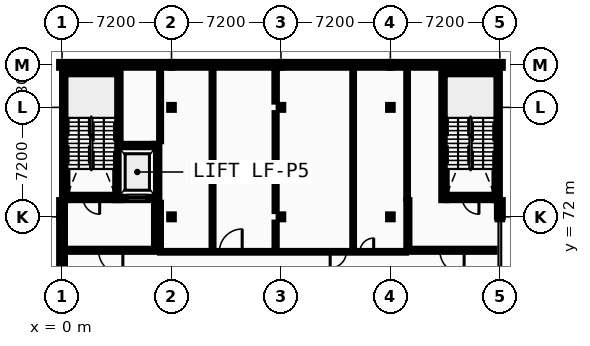
"""IFC4 building model, lengths in metres.
Left out: names, types, materials, properties, quantities, classifications, styles, units other than length and angle.
Written with IfcOpenShell. Run it as: python <this file> out.ifc"""

import sys

from ifc_helpers import new_model, si_unit, direction, frame, frame_2d, origin, origin_2d, place, context, subcontext, project, spatial, rectangle, i_section, extrude, element, fill, save


model = new_model("IFC4")
c1 = context("Model", 3, precision=1e-05, world=origin(), true_north=direction((0.0, 1.0)))
c2 = subcontext(c1, "Body", "Model", "MODEL_VIEW")
j1 = project(units=[si_unit("LENGTHUNIT", "METRE"), si_unit("PLANEANGLEUNIT", "RADIAN")], contexts=[c1])
p1 = place(None, origin())
s1 = spatial("IfcSite", under=j1, at=p1, CompositionType="ELEMENT")
p2 = place(p1, origin())
s2 = spatial("IfcBuilding", under=s1, at=p2, CompositionType="ELEMENT")
p3 = place(p2, frame((0.0, 0.0, 9.6)))
s3 = spatial("IfcBuildingStorey", under=s2, at=p3, CompositionType="ELEMENT", Elevation=9.6)
for number, where, z_axis, x_axis in (
    (1, (0.0, 72.0, 0.0), (0.0, 0.0, 1.0), (1.0, 0.0, 0.0)),
    (2, (0.0, 82.0, 0.0), (0.0, 0.0, 1.0), (1.0, 0.0, 0.0)),
    (3, (7.2, 72.0, 0.0), (0.0, 0.0, 1.0), (1.0, 0.0, 0.0)),
    (4, (7.2, 79.2, 0.0), (0.0, 0.0, 1.0), (1.0, 0.0, 0.0)),
    (5, (7.2, 82.0, 0.0), (0.0, 0.0, 1.0), (1.0, 0.0, 0.0)),
    (6, (14.4, 72.0, 0.0), (0.0, 0.0, 1.0), (1.0, 0.0, 0.0)),
    (7, (14.4, 79.2, 0.0), (0.0, 0.0, 1.0), (1.0, 0.0, 0.0)),
    (8, (14.4, 82.0, 0.0), (0.0, 0.0, 1.0), (1.0, 0.0, 0.0)),
    (9, (21.6, 72.0, 0.0), (0.0, 0.0, 1.0), (1.0, 0.0, 0.0)),
    (10, (21.6, 79.2, 0.0), (0.0, 0.0, 1.0), (1.0, 0.0, 0.0)),
    (11, (21.6, 82.0, 0.0), (0.0, 0.0, 1.0), (1.0, 0.0, 0.0)),
    (12, (28.8, 72.0, 0.0), (0.0, 0.0, 1.0), (1.0, 0.0, 0.0)),
    (13, (28.8, 82.0, 0.0), (0.0, 0.0, 1.0), (1.0, 0.0, 0.0)),
):
    element("IfcColumn", number, at=place(p3, frame(where, z_axis=z_axis, x_axis=x_axis)), inside=s3, PredefinedType="COLUMN", context=c2, shape_type="SweptSolid", body=[
        extrude(i_section(OverallWidth=0.3, OverallDepth=0.32, WebThickness=0.011, FlangeThickness=0.021, FilletRadius=0.027, at=origin_2d()), origin(), (0.0, 0.0, 1.0), 4.4),
    ])
p4 = place(p3, frame((7.2, 82.0, 0.0), z_axis=(0.0, 0.0, 1.0), x_axis=(-1.0, 0.0, 0.0)))
e14 = element("IfcWall", 14, at=p4, inside=s3, PredefinedType="STANDARD", context=c2, shape_type="SweptSolid", body=[
    extrude(rectangle(XDim=7.39, YDim=0.38, at=frame_2d((3.695, 0.0))), origin(), (0.0, 0.0, 1.0), 3.895),
])
p5 = place(p4, frame((1.6, 0.0, 0.95)))
e15 = element("IfcOpeningElement", 15, at=p5, cuts=e14, PredefinedType="OPENING", context=c2, shape_type="SweptSolid", body=[
    extrude(rectangle(XDim=1.234, YDim=1.26, at=frame_2d((0.617, 0.63))), frame((0.0, 0.2, 0.0), z_axis=(0.0, -1.0, 0.0), x_axis=(1.0, 0.0, 0.0)), (0.0, 0.0, 1.0), 0.4),
])
p6 = place(p4, frame((4.556, 0.0, 0.95)))
e16 = element("IfcOpeningElement", 16, at=p6, cuts=e14, PredefinedType="OPENING", context=c2, shape_type="SweptSolid", body=[
    extrude(rectangle(XDim=1.234, YDim=1.26, at=frame_2d((0.617, 0.63))), frame((0.0, 0.2, 0.0), z_axis=(0.0, -1.0, 0.0), x_axis=(1.0, 0.0, 0.0)), (0.0, 0.0, 1.0), 0.4),
])
p7 = place(p3, frame((14.4, 82.0, 0.0), z_axis=(0.0, 0.0, 1.0), x_axis=(-1.0, 0.0, 0.0)))
e17 = element("IfcWall", 17, at=p7, inside=s3, PredefinedType="STANDARD", context=c2, shape_type="SweptSolid", body=[
    extrude(rectangle(XDim=7.2, YDim=0.38, at=frame_2d((3.6, 0.0))), origin(), (0.0, 0.0, 1.0), 3.895),
])
p8 = place(p7, frame((1.526, 0.0, 0.95)))
e18 = element("IfcOpeningElement", 18, at=p8, cuts=e17, PredefinedType="OPENING", context=c2, shape_type="SweptSolid", body=[
    extrude(rectangle(XDim=1.268, YDim=1.26, at=frame_2d((0.634, 0.63))), frame((0.0, 0.2, 0.0), z_axis=(0.0, -1.0, 0.0), x_axis=(1.0, 0.0, 0.0)), (0.0, 0.0, 1.0), 0.4),
])
p9 = place(p3, frame((21.6, 82.0, 0.0), z_axis=(0.0, 0.0, 1.0), x_axis=(-1.0, 0.0, 0.0)))
e19 = element("IfcWall", 19, at=p9, inside=s3, PredefinedType="STANDARD", context=c2, shape_type="SweptSolid", body=[
    extrude(rectangle(XDim=7.2, YDim=0.38, at=frame_2d((3.6, 0.0))), origin(), (0.0, 0.0, 1.0), 3.895),
])
p10 = place(p9, frame((4.61, 0.0, 0.95)))
e20 = element("IfcOpeningElement", 20, at=p10, cuts=e19, PredefinedType="OPENING", context=c2, shape_type="SweptSolid", body=[
    extrude(rectangle(XDim=0.86, YDim=1.296, at=frame_2d((0.43, 0.648))), frame((0.0, 0.2, 0.0), z_axis=(0.0, -1.0, 0.0), x_axis=(1.0, 0.0, 0.0)), (0.0, 0.0, 1.0), 0.4),
])
p11 = place(p3, frame((28.99, 82.0, 0.0), z_axis=(0.0, 0.0, 1.0), x_axis=(-1.0, 0.0, 0.0)))
e21 = element("IfcWall", 21, at=p11, inside=s3, PredefinedType="STANDARD", context=c2, shape_type="SweptSolid", body=[
    extrude(rectangle(XDim=7.39, YDim=0.38, at=frame_2d((3.695, 0.0))), origin(), (0.0, 0.0, 1.0), 3.895),
])
p12 = place(p11, frame((1.77, 0.0, 0.95)))
e22 = element("IfcOpeningElement", 22, at=p12, cuts=e21, PredefinedType="OPENING", context=c2, shape_type="SweptSolid", body=[
    extrude(rectangle(XDim=0.894, YDim=1.296, at=frame_2d((0.447, 0.648))), frame((0.0, 0.2, 0.0), z_axis=(0.0, -1.0, 0.0), x_axis=(1.0, 0.0, 0.0)), (0.0, 0.0, 1.0), 0.4),
])
p13 = place(p11, frame((4.726, 0.0, 0.95)))
e23 = element("IfcOpeningElement", 23, at=p13, cuts=e21, PredefinedType="OPENING", context=c2, shape_type="SweptSolid", body=[
    extrude(rectangle(XDim=0.894, YDim=1.296, at=frame_2d((0.447, 0.648))), frame((0.0, 0.2, 0.0), z_axis=(0.0, -1.0, 0.0), x_axis=(1.0, 0.0, 0.0)), (0.0, 0.0, 1.0), 0.4),
])
p14 = place(p3, frame((0.0, 72.0, 0.0), z_axis=(0.0, 0.0, 1.0), x_axis=(0.0, -1.0, 0.0)))
e24 = element("IfcWall", 24, at=p14, inside=s3, PredefinedType="STANDARD", context=c2, shape_type="SweptSolid", body=[
    extrude(rectangle(XDim=7.2, YDim=0.38, at=frame_2d((3.6, 0.0))), origin(), (0.0, 0.0, 1.0), 3.885),
])
for number, where, z_axis, x_axis in (
    (25, (0.0, 73.1, 0.0), (0.0, 0.0, 1.0), (0.0, -1.0, 0.0)),
    (26, (28.8, 72.0, 0.0), (0.0, 0.0, 1.0), (0.0, 1.0, 0.0)),
):
    element("IfcWall", number, at=place(p3, frame(where, z_axis=z_axis, x_axis=x_axis)), inside=s3, PredefinedType="STANDARD", context=c2, shape_type="SweptSolid", body=[
        extrude(rectangle(XDim=1.1, YDim=0.38, at=frame_2d((0.55, 0.0))), origin(), (0.0, 0.0, 1.0), 4.2),
    ])
p15 = place(p3, frame((0.35, 73.275, 0.0), z_axis=(0.0, 0.0, 1.0), x_axis=(1.0, 0.0, 0.0)))
e27 = element("IfcWall", 27, at=p15, inside=s3, PredefinedType="SHEAR", context=c2, shape_type="SweptSolid", body=[
    extrude(rectangle(XDim=3.15, YDim=0.35, at=frame_2d((1.575, 0.0))), origin(), (0.0, 0.0, 1.0), 4.2),
])
p16 = place(p15, frame((1.025, 0.0, 0.0)))
e28 = element("IfcOpeningElement", 28, at=p16, cuts=e27, PredefinedType="OPENING", context=c2, shape_type="SweptSolid", body=[
    extrude(rectangle(XDim=1.1, YDim=2.15, at=frame_2d((0.55, 1.075))), frame((0.0, 0.185, 0.0), z_axis=(0.0, -1.0, 0.0), x_axis=(1.0, 0.0, 0.0)), (0.0, 0.0, 1.0), 0.37),
])
p17 = place(p3, frame((0.35, 81.425, 0.0), z_axis=(0.0, 0.0, 1.0), x_axis=(1.0, 0.0, 0.0)))
e29 = element("IfcWall", 29, at=p17, inside=s3, PredefinedType="SHEAR", context=c2, shape_type="SweptSolid", body=[
    extrude(rectangle(XDim=3.15, YDim=0.35, at=frame_2d((1.575, 0.0))), origin(), (0.0, 0.0, 1.0), 4.2),
])
for number, where, z_axis, x_axis in (
    (30, (0.175, 73.1, 0.0), (0.0, 0.0, 1.0), (0.0, 1.0, 0.0)),
    (31, (3.675, 73.1, 0.0), (0.0, 0.0, 1.0), (0.0, 1.0, 0.0)),
):
    element("IfcWall", number, at=place(p3, frame(where, z_axis=z_axis, x_axis=x_axis)), inside=s3, PredefinedType="SHEAR", context=c2, shape_type="SweptSolid", body=[
        extrude(rectangle(XDim=8.71, YDim=0.35, at=frame_2d((4.355, 0.0))), origin(), (0.0, 0.0, 1.0), 4.2),
    ])
p18 = place(p3, frame((3.85, 73.275, 0.0), z_axis=(0.0, 0.0, 1.0), x_axis=(1.0, 0.0, 0.0)))
e32 = element("IfcWall", 32, at=p18, inside=s3, PredefinedType="SHEAR", context=c2, shape_type="SweptSolid", body=[
    extrude(rectangle(XDim=2.2, YDim=0.35, at=frame_2d((1.1, 0.0))), origin(), (0.0, 0.0, 1.0), 4.2),
])
p19 = place(p18, frame((0.5, 0.0, 0.0)))
e33 = element("IfcOpeningElement", 33, at=p19, cuts=e32, PredefinedType="OPENING", context=c2, shape_type="SweptSolid", body=[
    extrude(rectangle(XDim=1.2, YDim=2.2, at=frame_2d((0.6, 1.1))), frame((0.0, 0.185, 0.0), z_axis=(0.0, -1.0, 0.0), x_axis=(1.0, 0.0, 0.0)), (0.0, 0.0, 1.0), 0.37),
])
p20 = place(p3, frame((3.85, 76.625, 0.0), z_axis=(0.0, 0.0, 1.0), x_axis=(1.0, 0.0, 0.0)))
e34 = element("IfcWall", 34, at=p20, inside=s3, PredefinedType="SHEAR", context=c2, shape_type="SweptSolid", body=[
    extrude(rectangle(XDim=2.2, YDim=0.35, at=frame_2d((1.1, 0.0))), origin(), (0.0, 0.0, 1.0), 4.2),
])
p21 = place(p3, frame((6.225, 73.1, 0.0), z_axis=(0.0, 0.0, 1.0), x_axis=(0.0, 1.0, 0.0)))
e35 = element("IfcWall", 35, at=p21, inside=s3, PredefinedType="SHEAR", context=c2, shape_type="SweptSolid", body=[
    extrude(rectangle(XDim=3.7, YDim=0.35, at=frame_2d((1.85, 0.0))), origin(), (0.0, 0.0, 1.0), 4.2),
])
p22 = place(p3, frame((0.35, 69.8, 0.0), z_axis=(0.0, 0.0, 1.0), x_axis=(1.0, 0.0, 0.0)))
e36 = element("IfcWall", 36, at=p22, inside=s3, PredefinedType="PARTITIONING", context=c2, shape_type="SweptSolid", body=[
    extrude(rectangle(XDim=5.7, YDim=0.2, at=frame_2d((2.85, 0.0))), origin(), (0.0, 0.0, 1.0), 4.2),
])
p23 = place(p22, frame((2.05, 0.0, 0.0)))
e37 = element("IfcOpeningElement", 37, at=p23, cuts=e36, PredefinedType="OPENING", context=c2, shape_type="SweptSolid", body=[
    extrude(rectangle(XDim=1.6, YDim=2.2, at=frame_2d((0.8, 1.1))), frame((0.0, 0.11, 0.0), z_axis=(0.0, -1.0, 0.0), x_axis=(1.0, 0.0, 0.0)), (0.0, 0.0, 1.0), 0.22),
])
p24 = place(p3, frame((6.15, 69.9, 0.0), z_axis=(0.0, 0.0, 1.0), x_axis=(0.0, 1.0, 0.0)))
e38 = element("IfcWall", 38, at=p24, inside=s3, PredefinedType="PARTITIONING", context=c2, shape_type="SweptSolid", body=[
    extrude(rectangle(XDim=3.2, YDim=0.2, at=frame_2d((1.6, 0.0))), origin(), (0.0, 0.0, 1.0), 4.2),
])
p25 = place(p3, frame((25.3, 73.275, 0.0), z_axis=(0.0, 0.0, 1.0), x_axis=(1.0, 0.0, 0.0)))
e39 = element("IfcWall", 39, at=p25, inside=s3, PredefinedType="SHEAR", context=c2, shape_type="SweptSolid", body=[
    extrude(rectangle(XDim=3.15, YDim=0.35, at=frame_2d((1.575, 0.0))), origin(), (0.0, 0.0, 1.0), 4.2),
])
p26 = place(p25, frame((1.025, 0.0, 0.0)))
e40 = element("IfcOpeningElement", 40, at=p26, cuts=e39, PredefinedType="OPENING", context=c2, shape_type="SweptSolid", body=[
    extrude(rectangle(XDim=1.1, YDim=2.15, at=frame_2d((0.55, 1.075))), frame((0.0, 0.185, 0.0), z_axis=(0.0, -1.0, 0.0), x_axis=(1.0, 0.0, 0.0)), (0.0, 0.0, 1.0), 0.37),
])
p27 = place(p3, frame((25.3, 81.425, 0.0), z_axis=(0.0, 0.0, 1.0), x_axis=(1.0, 0.0, 0.0)))
e41 = element("IfcWall", 41, at=p27, inside=s3, PredefinedType="SHEAR", context=c2, shape_type="SweptSolid", body=[
    extrude(rectangle(XDim=3.15, YDim=0.35, at=frame_2d((1.575, 0.0))), origin(), (0.0, 0.0, 1.0), 4.2),
])
for number, where, z_axis, x_axis in (
    (42, (25.125, 73.1, 0.0), (0.0, 0.0, 1.0), (0.0, 1.0, 0.0)),
    (43, (28.625, 73.1, 0.0), (0.0, 0.0, 1.0), (0.0, 1.0, 0.0)),
):
    element("IfcWall", number, at=place(p3, frame(where, z_axis=z_axis, x_axis=x_axis)), inside=s3, PredefinedType="SHEAR", context=c2, shape_type="SweptSolid", body=[
        extrude(rectangle(XDim=8.71, YDim=0.35, at=frame_2d((4.355, 0.0))), origin(), (0.0, 0.0, 1.0), 4.2),
    ])
p28 = place(p3, frame((22.85, 69.8, 0.0), z_axis=(0.0, 0.0, 1.0), x_axis=(1.0, 0.0, 0.0)))
e44 = element("IfcWall", 44, at=p28, inside=s3, PredefinedType="PARTITIONING", context=c2, shape_type="SweptSolid", body=[
    extrude(rectangle(XDim=5.6, YDim=0.2, at=frame_2d((2.8, 0.0))), origin(), (0.0, 0.0, 1.0), 4.2),
])
p29 = place(p28, frame((2.0, 0.0, 0.0)))
e45 = element("IfcOpeningElement", 45, at=p29, cuts=e44, PredefinedType="OPENING", context=c2, shape_type="SweptSolid", body=[
    extrude(rectangle(XDim=1.6, YDim=2.2, at=frame_2d((0.8, 1.1))), frame((0.0, 0.11, 0.0), z_axis=(0.0, -1.0, 0.0), x_axis=(1.0, 0.0, 0.0)), (0.0, 0.0, 1.0), 0.22),
])
p30 = place(p3, frame((22.75, 69.9, 0.0), z_axis=(0.0, 0.0, 1.0), x_axis=(0.0, 1.0, 0.0)))
e46 = element("IfcWall", 46, at=p30, inside=s3, PredefinedType="PARTITIONING", context=c2, shape_type="SweptSolid", body=[
    extrude(rectangle(XDim=3.2, YDim=0.2, at=frame_2d((1.6, 0.0))), origin(), (0.0, 0.0, 1.0), 4.2),
])
p31 = place(p3, frame((6.45, 69.7, 0.0), z_axis=(0.0, 0.0, 1.0), x_axis=(1.0, 0.0, 0.0)))
e47 = element("IfcWall", 47, at=p31, inside=s3, PredefinedType="PARTITIONING", context=c2, shape_type="SweptSolid", body=[
    extrude(rectangle(XDim=16.18, YDim=0.11, at=frame_2d((8.09, 0.0))), origin(), (0.0, 0.0, 1.0), 4.2),
])
p32 = place(p31, frame((2.0, 0.0, 0.0)))
e48 = element("IfcOpeningElement", 48, at=p32, cuts=e47, PredefinedType="OPENING", context=c2, shape_type="SweptSolid", body=[
    extrude(rectangle(XDim=1.0, YDim=2.1, at=frame_2d((0.5, 1.05))), frame((0.0, 0.065, 0.0), z_axis=(0.0, -1.0, 0.0), x_axis=(1.0, 0.0, 0.0)), (0.0, 0.0, 1.0), 0.13),
])
p33 = place(p31, frame((13.15, 0.0, 0.0)))
e49 = element("IfcOpeningElement", 49, at=p33, cuts=e47, PredefinedType="OPENING", context=c2, shape_type="SweptSolid", body=[
    extrude(rectangle(XDim=0.9, YDim=2.1, at=frame_2d((0.45, 1.05))), frame((0.0, 0.065, 0.0), z_axis=(0.0, -1.0, 0.0), x_axis=(1.0, 0.0, 0.0)), (0.0, 0.0, 1.0), 0.13),
])
p34 = place(p31, frame((3.9, 0.0, 0.0)))
e50 = element("IfcOpeningElement", 50, at=p34, cuts=e47, PredefinedType="OPENING", context=c2, shape_type="SweptSolid", body=[
    extrude(rectangle(XDim=1.5, YDim=2.2, at=frame_2d((0.75, 1.1))), frame((0.0, 0.065, 0.0), z_axis=(0.0, -1.0, 0.0), x_axis=(1.0, 0.0, 0.0)), (0.0, 0.0, 1.0), 0.13),
])
p35 = place(p31, frame((11.188, 0.0, 0.0)))
e51 = element("IfcOpeningElement", 51, at=p35, cuts=e47, PredefinedType="OPENING", context=c2, shape_type="SweptSolid", body=[
    extrude(rectangle(XDim=1.062, YDim=2.152, at=frame_2d((0.531, 1.076))), frame((0.0, 0.065, 0.0), z_axis=(0.0, -1.0, 0.0), x_axis=(1.0, 0.0, 0.0)), (0.0, 0.0, 1.0), 0.13),
])
p36 = place(p3, frame((6.45, 69.755, 0.0), z_axis=(0.0, 0.0, 1.0), x_axis=(0.0, 1.0, 0.0)))
e52 = element("IfcWall", 52, at=p36, inside=s3, PredefinedType="PARTITIONING", context=c2, shape_type="SweptSolid", body=[
    extrude(rectangle(XDim=3.17, YDim=0.11, at=frame_2d((1.585, 0.0))), origin(), (0.0, 0.0, 1.0), 4.2),
])
p37 = place(p3, frame((6.45, 76.975, 0.0), z_axis=(0.0, 0.0, 1.0), x_axis=(0.0, 1.0, 0.0)))
e53 = element("IfcWall", 53, at=p37, inside=s3, PredefinedType="PARTITIONING", context=c2, shape_type="SweptSolid", body=[
    extrude(rectangle(XDim=4.825, YDim=0.125, at=frame_2d((2.413, 0.0))), origin(), (0.0, 0.0, 1.0), 4.2),
])
p38 = place(p3, frame((9.9, 69.755, 0.0), z_axis=(0.0, 0.0, 1.0), x_axis=(0.0, 1.0, 0.0)))
e54 = element("IfcWall", 54, at=p38, inside=s3, PredefinedType="PARTITIONING", context=c2, shape_type="SweptSolid", body=[
    extrude(rectangle(XDim=12.045, YDim=0.125, at=frame_2d((6.022, 0.0))), origin(), (0.0, 0.0, 1.0), 4.2),
])
p39 = place(p3, frame((14.05, 69.755, 0.0), z_axis=(0.0, 0.0, 1.0), x_axis=(0.0, 1.0, 0.0)))
e55 = element("IfcWall", 55, at=p39, inside=s3, PredefinedType="PARTITIONING", context=c2, shape_type="SweptSolid", body=[
    extrude(rectangle(XDim=1.865, YDim=0.142, at=frame_2d((0.933, 0.0))), origin(), (0.0, 0.0, 1.0), 4.2),
])
p40 = place(p3, frame((14.05, 72.38, 0.0), z_axis=(0.0, 0.0, 1.0), x_axis=(0.0, 1.0, 0.0)))
e56 = element("IfcWall", 56, at=p40, inside=s3, PredefinedType="PARTITIONING", context=c2, shape_type="SweptSolid", body=[
    extrude(rectangle(XDim=6.44, YDim=0.135, at=frame_2d((3.22, 0.0))), origin(), (0.0, 0.0, 1.0), 4.2),
])
p41 = place(p3, frame((14.05, 79.58, 0.0), z_axis=(0.0, 0.0, 1.0), x_axis=(0.0, 1.0, 0.0)))
e57 = element("IfcWall", 57, at=p41, inside=s3, PredefinedType="PARTITIONING", context=c2, shape_type="SweptSolid", body=[
    extrude(rectangle(XDim=2.04, YDim=0.16, at=frame_2d((1.02, 0.0))), origin(), (0.0, 0.0, 1.0), 4.2),
])
p42 = place(p3, frame((19.15, 69.755, 0.0), z_axis=(0.0, 0.0, 1.0), x_axis=(0.0, 1.0, 0.0)))
e58 = element("IfcWall", 58, at=p42, inside=s3, PredefinedType="PARTITIONING", context=c2, shape_type="SweptSolid", body=[
    extrude(rectangle(XDim=12.045, YDim=0.11, at=frame_2d((6.022, 0.0))), origin(), (0.0, 0.0, 1.0), 3.915),
])
p43 = place(p3, frame((22.7, 73.2, 0.0), z_axis=(0.0, 0.0, 1.0), x_axis=(0.0, 1.0, 0.0)))
e59 = element("IfcWall", 59, at=p43, inside=s3, PredefinedType="PARTITIONING", context=c2, shape_type="SweptSolid", body=[
    extrude(rectangle(XDim=8.6, YDim=0.11, at=frame_2d((4.3, 0.0))), origin(), (0.0, 0.0, 1.0), 4.2),
])
p44 = place(p5, origin())
e60 = element("IfcWindow", 60, at=p44, inside=s3, PartitioningType="SINGLE_PANEL", PredefinedType="WINDOW", context=c2, shape_type="SweptSolid", body=[
    extrude(rectangle(XDim=1.234, YDim=1.26, at=frame_2d((0.617, 0.63))), frame((0.0, 0.03, 0.0), z_axis=(0.0, -1.0, 0.0), x_axis=(1.0, 0.0, 0.0)), (0.0, 0.0, 1.0), 0.06),
])
fill(e15, e60)
p45 = place(p6, origin())
e61 = element("IfcWindow", 61, at=p45, inside=s3, PartitioningType="SINGLE_PANEL", PredefinedType="WINDOW", context=c2, shape_type="SweptSolid", body=[
    extrude(rectangle(XDim=1.234, YDim=1.26, at=frame_2d((0.617, 0.63))), frame((0.0, 0.03, 0.0), z_axis=(0.0, -1.0, 0.0), x_axis=(1.0, 0.0, 0.0)), (0.0, 0.0, 1.0), 0.06),
])
fill(e16, e61)
p46 = place(p8, origin())
e62 = element("IfcWindow", 62, at=p46, inside=s3, PartitioningType="SINGLE_PANEL", PredefinedType="WINDOW", context=c2, shape_type="SweptSolid", body=[
    extrude(rectangle(XDim=1.268, YDim=1.26, at=frame_2d((0.634, 0.63))), frame((0.0, 0.03, 0.0), z_axis=(0.0, -1.0, 0.0), x_axis=(1.0, 0.0, 0.0)), (0.0, 0.0, 1.0), 0.06),
])
fill(e18, e62)
p47 = place(p10, origin())
e63 = element("IfcWindow", 63, at=p47, inside=s3, PartitioningType="SINGLE_PANEL", PredefinedType="WINDOW", context=c2, shape_type="SweptSolid", body=[
    extrude(rectangle(XDim=0.86, YDim=1.296, at=frame_2d((0.43, 0.648))), frame((0.0, 0.03, 0.0), z_axis=(0.0, -1.0, 0.0), x_axis=(1.0, 0.0, 0.0)), (0.0, 0.0, 1.0), 0.06),
])
fill(e20, e63)
p48 = place(p12, origin())
e64 = element("IfcWindow", 64, at=p48, inside=s3, PartitioningType="SINGLE_PANEL", PredefinedType="WINDOW", context=c2, shape_type="SweptSolid", body=[
    extrude(rectangle(XDim=0.894, YDim=1.296, at=frame_2d((0.447, 0.648))), frame((0.0, 0.03, 0.0), z_axis=(0.0, -1.0, 0.0), x_axis=(1.0, 0.0, 0.0)), (0.0, 0.0, 1.0), 0.06),
])
fill(e22, e64)
p49 = place(p13, origin())
e65 = element("IfcWindow", 65, at=p49, inside=s3, PartitioningType="SINGLE_PANEL", PredefinedType="WINDOW", context=c2, shape_type="SweptSolid", body=[
    extrude(rectangle(XDim=0.894, YDim=1.296, at=frame_2d((0.447, 0.648))), frame((0.0, 0.03, 0.0), z_axis=(0.0, -1.0, 0.0), x_axis=(1.0, 0.0, 0.0)), (0.0, 0.0, 1.0), 0.06),
])
fill(e23, e65)
p50 = place(p16, origin())
e66 = element("IfcDoor", 66, at=p50, inside=s3, OperationType="SINGLE_SWING_RIGHT", PredefinedType="DOOR", context=c2, shape_type="SweptSolid", body=[
    extrude(rectangle(XDim=1.1, YDim=2.15, at=frame_2d((0.55, 1.075))), frame((0.0, 0.025, 0.0), z_axis=(0.0, -1.0, 0.0), x_axis=(1.0, 0.0, 0.0)), (0.0, 0.0, 1.0), 0.05),
])
fill(e28, e66)
p51 = place(p19, origin())
e67 = element("IfcDoor", 67, at=p51, inside=s3, OperationType="SLIDING_TO_RIGHT", PredefinedType="DOOR", context=c2, shape_type="SweptSolid", body=[
    extrude(rectangle(XDim=1.2, YDim=2.2, at=frame_2d((0.6, 1.1))), frame((0.0, 0.025, 0.0), z_axis=(0.0, -1.0, 0.0), x_axis=(1.0, 0.0, 0.0)), (0.0, 0.0, 1.0), 0.05),
])
fill(e33, e67)
p52 = place(p23, origin())
e68 = element("IfcDoor", 68, at=p52, inside=s3, OperationType="DOUBLE_DOOR_SINGLE_SWING", PredefinedType="DOOR", context=c2, shape_type="SweptSolid", body=[
    extrude(rectangle(XDim=1.6, YDim=2.2, at=frame_2d((0.8, 1.1))), frame((0.0, 0.025, 0.0), z_axis=(0.0, -1.0, 0.0), x_axis=(1.0, 0.0, 0.0)), (0.0, 0.0, 1.0), 0.05),
])
fill(e37, e68)
p53 = place(p26, origin())
e69 = element("IfcDoor", 69, at=p53, inside=s3, OperationType="SINGLE_SWING_RIGHT", PredefinedType="DOOR", context=c2, shape_type="SweptSolid", body=[
    extrude(rectangle(XDim=1.1, YDim=2.15, at=frame_2d((0.55, 1.075))), frame((0.0, 0.025, 0.0), z_axis=(0.0, -1.0, 0.0), x_axis=(1.0, 0.0, 0.0)), (0.0, 0.0, 1.0), 0.05),
])
fill(e40, e69)
p54 = place(p29, origin())
e70 = element("IfcDoor", 70, at=p54, inside=s3, OperationType="DOUBLE_DOOR_SINGLE_SWING", PredefinedType="DOOR", context=c2, shape_type="SweptSolid", body=[
    extrude(rectangle(XDim=1.6, YDim=2.2, at=frame_2d((0.8, 1.1))), frame((0.0, 0.025, 0.0), z_axis=(0.0, -1.0, 0.0), x_axis=(1.0, 0.0, 0.0)), (0.0, 0.0, 1.0), 0.05),
])
fill(e45, e70)
p55 = place(p32, frame((1.0, 0.0, 0.0), z_axis=(0.0, 0.0, 1.0), x_axis=(-1.0, 0.0, 0.0)))
e71 = element("IfcDoor", 71, at=p55, inside=s3, OperationType="SLIDING_TO_LEFT", PredefinedType="DOOR", context=c2, shape_type="SweptSolid", body=[
    extrude(rectangle(XDim=1.0, YDim=2.1, at=frame_2d((0.5, 1.05))), frame((0.0, 0.025, 0.0), z_axis=(0.0, -1.0, 0.0), x_axis=(1.0, 0.0, 0.0)), (0.0, 0.0, 1.0), 0.05),
])
fill(e48, e71)
p56 = place(p33, frame((0.9, 0.0, 0.0), z_axis=(0.0, 0.0, 1.0), x_axis=(-1.0, 0.0, 0.0)))
e72 = element("IfcDoor", 72, at=p56, inside=s3, OperationType="SINGLE_SWING_RIGHT", PredefinedType="DOOR", context=c2, shape_type="SweptSolid", body=[
    extrude(rectangle(XDim=0.9, YDim=2.1, at=frame_2d((0.45, 1.05))), frame((0.0, 0.025, 0.0), z_axis=(0.0, -1.0, 0.0), x_axis=(1.0, 0.0, 0.0)), (0.0, 0.0, 1.0), 0.05),
])
fill(e49, e72)
p57 = place(p34, frame((1.5, 0.0, 0.0), z_axis=(0.0, 0.0, 1.0), x_axis=(-1.0, 0.0, 0.0)))
e73 = element("IfcDoor", 73, at=p57, inside=s3, OperationType="DOUBLE_DOOR_SINGLE_SWING", PredefinedType="DOOR", context=c2, shape_type="SweptSolid", body=[
    extrude(rectangle(XDim=1.5, YDim=2.2, at=frame_2d((0.75, 1.1))), frame((0.0, 0.025, 0.0), z_axis=(0.0, -1.0, 0.0), x_axis=(1.0, 0.0, 0.0)), (0.0, 0.0, 1.0), 0.05),
])
fill(e50, e73)
p58 = place(p35, frame((1.062, 0.0, 0.0), z_axis=(0.0, 0.0, 1.0), x_axis=(-1.0, 0.0, 0.0)))
e74 = element("IfcDoor", 74, at=p58, inside=s3, OperationType="SINGLE_SWING_LEFT", PredefinedType="DOOR", context=c2, shape_type="SweptSolid", body=[
    extrude(rectangle(XDim=1.062, YDim=2.152, at=frame_2d((0.531, 1.076))), frame((0.0, 0.025, 0.0), z_axis=(0.0, -1.0, 0.0), x_axis=(1.0, 0.0, 0.0)), (0.0, 0.0, 1.0), 0.05),
])
fill(e51, e74)
save(model, sys.argv[1])
